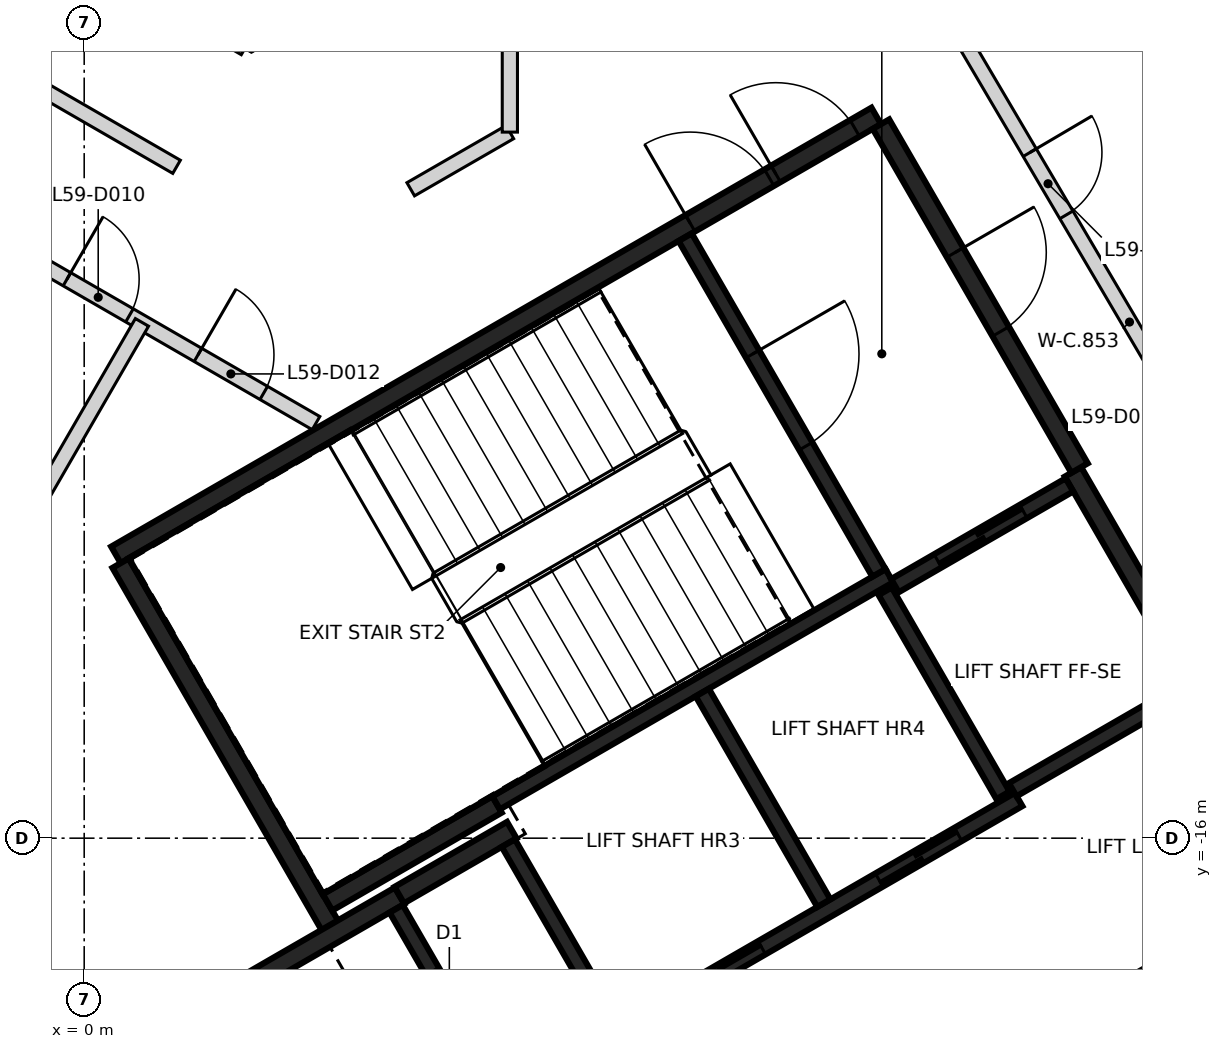
"""IFC4 building model, lengths in metres.
Left out: names, types, materials, properties, quantities, classifications, styles, units other than length and angle.
Written with IfcOpenShell. Run it as: python <this file> out.ifc"""

import sys

from ifc_helpers import new_model, si_unit, direction, frame, frame_2d, origin, place, context, subcontext, project, spatial, rectangle, extrude, element, fill, save


model = new_model("IFC4")
c1 = context("Model", 3, precision=1e-05, world=origin(), true_north=direction((0.0, 1.0)))
c2 = subcontext(c1, "Body", "Model", "MODEL_VIEW")
j1 = project(units=[si_unit("LENGTHUNIT", "METRE"), si_unit("PLANEANGLEUNIT", "RADIAN")], contexts=[c1])
p1 = place(None, origin())
s1 = spatial("IfcSite", under=j1, at=p1, CompositionType="ELEMENT")
p2 = place(p1, origin())
s2 = spatial("IfcBuilding", under=s1, at=p2, CompositionType="ELEMENT")
p3 = place(p2, frame((0.0, 0.0, 235.8)))
s3 = spatial("IfcBuildingStorey", under=s2, at=p3, CompositionType="ELEMENT", Elevation=235.8)
p4 = place(p3, frame((0.417, -12.273, 0.0), z_axis=(0.0, 0.0, 1.0), x_axis=(0.866021906294, 0.500006057782, 0.0)))
e1 = element("IfcWall", 1, at=p4, inside=s3, PredefinedType="SHEAR", context=c2, shape_type="SweptSolid", body=[
    extrude(rectangle(XDim=11.55, YDim=0.25, at=frame_2d((5.775, 0.0))), origin(), (0.0, 0.0, 1.0), 3.25),
])
p5 = place(p4, frame((10.025, 0.0, 0.0)))
e2 = element("IfcOpeningElement", 2, at=p5, cuts=e1, PredefinedType="OPENING", context=c2, shape_type="SweptSolid", body=[
    extrude(rectangle(XDim=1.2, YDim=2.1, at=frame_2d((0.6, 1.05))), frame((0.0, 0.135, 0.0), z_axis=(0.0, -1.0, 0.0), x_axis=(1.0, 0.0, 0.0)), (0.0, 0.0, 1.0), 0.27),
])
p6 = place(p4, frame((8.725, 0.0, 0.0)))
e3 = element("IfcOpeningElement", 3, at=p6, cuts=e1, PredefinedType="OPENING", context=c2, shape_type="SweptSolid", body=[
    extrude(rectangle(XDim=1.2, YDim=2.1, at=frame_2d((0.6, 1.05))), frame((0.0, 0.135, 0.0), z_axis=(0.0, -1.0, 0.0), x_axis=(1.0, 0.0, 0.0)), (0.0, 0.0, 1.0), 0.27),
])
p7 = place(p3, frame((16.133, -16.594, 0.0), z_axis=(0.0, 0.0, 1.0), x_axis=(-0.866022959057, -0.500004234368, 0.0)))
e4 = element("IfcWall", 4, at=p7, inside=s3, PredefinedType="SHEAR", context=c2, shape_type="SweptSolid", body=[
    extrude(rectangle(XDim=8.75, YDim=0.25, at=frame_2d((4.375, 0.0))), origin(), (0.0, 0.0, 1.0), 3.25),
])
p8 = place(p3, frame((13.008, -11.181, 0.0), z_axis=(0.0, 0.0, 1.0), x_axis=(0.500001955336, -0.866024274868, 0.0)))
e5 = element("IfcWall", 5, at=p8, inside=s3, PredefinedType="SHEAR", context=c2, shape_type="SweptSolid", body=[
    extrude(rectangle(XDim=6.125, YDim=0.25, at=frame_2d((3.062, 0.0))), origin(), (0.0, 0.0, 1.0), 3.25),
])
p9 = place(p8, frame((3.563, 0.0, 0.0)))
e6 = element("IfcOpeningElement", 6, at=p9, cuts=e5, PredefinedType="OPENING", context=c2, shape_type="SweptSolid", body=[
    extrude(rectangle(XDim=1.0, YDim=2.1, at=frame_2d((0.5, 1.05))), frame((0.0, 0.135, 0.0), z_axis=(0.0, -1.0, 0.0), x_axis=(1.0, 0.0, 0.0)), (0.0, 0.0, 1.0), 0.27),
])
p10 = place(p3, frame((3.235, -17.153, 0.0), z_axis=(0.0, 0.0, 1.0), x_axis=(-0.500008851346, 0.866020293397, 0.0)))
e7 = element("IfcWall", 7, at=p10, inside=s3, PredefinedType="SHEAR", context=c2, shape_type="SweptSolid", body=[
    extrude(rectangle(XDim=5.51, YDim=0.25, at=frame_2d((2.755, 0.0))), origin(), (0.0, 0.0, 1.0), 3.25),
])
p11 = place(p3, frame((10.483, -6.606, 0.0), z_axis=(0.0, 0.0, 1.0), x_axis=(0.49999885962, -0.866026062182, 0.0)))
e8 = element("IfcWall", 8, at=p11, inside=s3, PredefinedType="SHEAR", context=c2, shape_type="SweptSolid", body=[
    extrude(rectangle(XDim=5.225, YDim=0.25, at=frame_2d((2.612, 0.0))), origin(), (0.0, 0.0, 1.0), 3.25),
])
p12 = place(p11, frame((1.95, 0.0, 0.0)))
e9 = element("IfcOpeningElement", 9, at=p12, cuts=e8, PredefinedType="OPENING", context=c2, shape_type="SweptSolid", body=[
    extrude(rectangle(XDim=1.2, YDim=2.1, at=frame_2d((0.6, 1.05))), frame((0.0, 0.135, 0.0), z_axis=(0.0, -1.0, 0.0), x_axis=(1.0, 0.0, 0.0)), (0.0, 0.0, 1.0), 0.27),
])
p13 = place(p3, frame((1.669, -18.19, 0.0), z_axis=(0.0, 0.0, 1.0), x_axis=(0.866042235819, 0.499970844928, 0.0)))
e10 = element("IfcWall", 10, at=p13, inside=s3, PredefinedType="SHEAR", context=c2, shape_type="SweptSolid", body=[
    extrude(rectangle(XDim=2.865, YDim=0.25, at=frame_2d((1.432, 0.0))), origin(), (0.0, 0.0, 1.0), 3.25),
])
p14 = place(p3, frame((5.431, -15.556, 0.0), z_axis=(0.0, 0.0, 1.0), x_axis=(-0.866022940537, -0.500004266446, 0.0)))
e11 = element("IfcWall", 11, at=p14, inside=s3, PredefinedType="SHEAR", context=c2, shape_type="SweptSolid", body=[
    extrude(rectangle(XDim=2.575, YDim=0.25, at=frame_2d((1.287, 0.0))), origin(), (0.0, 0.0, 1.0), 3.25),
])
p15 = place(p3, frame((4.145, -16.749, 0.0), z_axis=(0.0, 0.0, 1.0), x_axis=(0.866038183914, 0.499977863513, 0.0)))
e12 = element("IfcWall", 12, at=p15, inside=s3, PredefinedType="SHEAR", context=c2, shape_type="SweptSolid", body=[
    extrude(rectangle(XDim=1.71, YDim=0.25, at=frame_2d((0.855, 0.0))), origin(), (0.0, 0.0, 1.0), 3.25),
])
p16 = place(p3, frame((5.419, -15.534, 0.0), z_axis=(0.0, 0.0, 1.0), x_axis=(0.866029065029, 0.499993658486, 0.0)))
e13 = element("IfcWall", 13, at=p16, inside=s3, PredefinedType="SHEAR", context=c2, shape_type="SweptSolid", body=[
    extrude(rectangle(XDim=5.974, YDim=0.2, at=frame_2d((2.987, 0.0))), origin(), (0.0, 0.0, 1.0), 3.25),
])
p17 = place(p3, frame((7.01, -18.542, 0.0), z_axis=(0.0, 0.0, 1.0), x_axis=(0.866030299012, 0.499991521122, 0.0)))
e14 = element("IfcWall", 14, at=p17, inside=s3, PredefinedType="SHEAR", context=c2, shape_type="SweptSolid", body=[
    extrude(rectangle(XDim=6.1, YDim=0.2, at=frame_2d((3.05, 0.0))), origin(), (0.0, 0.0, 1.0), 3.25),
])
p18 = place(p17, frame((1.0, 0.0, 0.0)))
e15 = element("IfcOpeningElement", 15, at=p18, cuts=e14, PredefinedType="OPENING", context=c2, shape_type="SweptSolid", body=[
    extrude(rectangle(XDim=1.2, YDim=2.1, at=frame_2d((0.6, 1.05))), frame((0.0, 0.11, 0.0), z_axis=(0.0, -1.0, 0.0), x_axis=(1.0, 0.0, 0.0)), (0.0, 0.0, 1.0), 0.22),
])
p19 = place(p17, frame((3.982, 0.0, 0.0)))
e16 = element("IfcOpeningElement", 16, at=p19, cuts=e14, PredefinedType="OPENING", context=c2, shape_type="SweptSolid", body=[
    extrude(rectangle(XDim=1.2, YDim=2.1, at=frame_2d((0.6, 1.05))), frame((0.0, 0.11, 0.0), z_axis=(0.0, -1.0, 0.0), x_axis=(1.0, 0.0, 0.0)), (0.0, 0.0, 1.0), 0.22),
])
p20 = place(p3, frame((7.906, -8.094, 0.0), z_axis=(0.0, 0.0, 1.0), x_axis=(0.500027839223, -0.866009330205, 0.0)))
e17 = element("IfcWall", 17, at=p20, inside=s3, PredefinedType="SHEAR", context=c2, shape_type="SweptSolid", body=[
    extrude(rectangle(XDim=5.098, YDim=0.2, at=frame_2d((2.549, 0.0))), origin(), (0.0, 0.0, 1.0), 3.25),
])
p21 = place(p20, frame((1.774, 0.0, 0.0)))
e18 = element("IfcOpeningElement", 18, at=p21, cuts=e17, PredefinedType="OPENING", context=c2, shape_type="SweptSolid", body=[
    extrude(rectangle(XDim=1.4, YDim=2.1, at=frame_2d((0.7, 1.05))), frame((0.0, 0.11, 0.0), z_axis=(0.0, -1.0, 0.0), x_axis=(1.0, 0.0, 0.0)), (0.0, 0.0, 1.0), 0.22),
])
p22 = place(p3, frame((8.132, -14.084, 0.0), z_axis=(0.0, 0.0, 1.0), x_axis=(0.499997778408, -0.866026686418, 0.0)))
e19 = element("IfcWall", 19, at=p22, inside=s3, PredefinedType="SHEAR", context=c2, shape_type="SweptSolid", body=[
    extrude(rectangle(XDim=3.198, YDim=0.2, at=frame_2d((1.599, 0.0))), origin(), (0.0, 0.0, 1.0), 3.25),
])
p23 = place(p3, frame((5.503, -19.352, 0.0), z_axis=(0.0, 0.0, 1.0), x_axis=(-0.499986818241, 0.866033014143, 0.0)))
e20 = element("IfcWall", 20, at=p23, inside=s3, PredefinedType="SHEAR", context=c2, shape_type="SweptSolid", body=[
    extrude(rectangle(XDim=2.798, YDim=0.2, at=frame_2d((1.399, 0.0))), origin(), (0.0, 0.0, 1.0), 3.25),
])
p24 = place(p23, frame((0.949, 0.0, 0.0)))
e21 = element("IfcOpeningElement", 21, at=p24, cuts=e20, PredefinedType="OPENING", context=c2, shape_type="SweptSolid", body=[
    extrude(rectangle(XDim=0.9, YDim=2.1, at=frame_2d((0.45, 1.05))), frame((0.0, 0.11, 0.0), z_axis=(0.0, -1.0, 0.0), x_axis=(1.0, 0.0, 0.0)), (0.0, 0.0, 1.0), 0.22),
])
p25 = place(p3, frame((6.96, -18.455, 0.0), z_axis=(0.0, 0.0, 1.0), x_axis=(-0.499926705758, 0.866067716099, 0.0)))
e22 = element("IfcWall", 22, at=p25, inside=s3, PredefinedType="SHEAR", context=c2, shape_type="SweptSolid", body=[
    extrude(rectangle(XDim=2.759, YDim=0.2, at=frame_2d((1.38, 0.0))), origin(), (0.0, 0.0, 1.0), 3.25),
])
p26 = place(p3, frame((12.088, -15.437, 0.0), z_axis=(0.0, 0.0, 1.0), x_axis=(-0.500026960575, 0.86600983753, 0.0)))
e23 = element("IfcWall", 23, at=p26, inside=s3, PredefinedType="SHEAR", context=c2, shape_type="SweptSolid", body=[
    extrude(rectangle(XDim=3.1, YDim=0.2, at=frame_2d((1.55, 0.0))), origin(), (0.0, 0.0, 1.0), 3.25),
])
p27 = place(p3, frame((10.666, -12.678, 0.0), z_axis=(0.0, 0.0, 1.0), x_axis=(0.866018407898, 0.500012117035, 0.0)))
e24 = element("IfcWall", 24, at=p27, inside=s3, PredefinedType="SHEAR", context=c2, shape_type="SweptSolid", body=[
    extrude(rectangle(XDim=2.651, YDim=0.2, at=frame_2d((1.325, 0.0))), origin(), (0.0, 0.0, 1.0), 3.25),
])
p28 = place(p27, frame((0.652, 0.0, 0.0)))
e25 = element("IfcOpeningElement", 25, at=p28, cuts=e24, PredefinedType="OPENING", context=c2, shape_type="SweptSolid", body=[
    extrude(rectangle(XDim=1.3, YDim=2.1, at=frame_2d((0.65, 1.05))), frame((0.0, 0.11, 0.0), z_axis=(0.0, -1.0, 0.0), x_axis=(1.0, 0.0, 0.0)), (0.0, 0.0, 1.0), 0.22),
])
p29 = place(p3, frame((14.512, -14.037, 0.0), z_axis=(0.0, 0.0, 1.0), x_axis=(-0.866018407898, -0.500012117035, 0.0)))
e26 = element("IfcWall", 26, at=p29, inside=s3, PredefinedType="SHEAR", context=c2, shape_type="SweptSolid", body=[
    extrude(rectangle(XDim=2.651, YDim=0.2, at=frame_2d((1.325, 0.0))), origin(), (0.0, 0.0, 1.0), 3.25),
])
p30 = place(p3, frame((-8.612, -1.494, 0.0), z_axis=(0.0, 0.0, 1.0), x_axis=(0.866035468681, -0.499982566683, 0.0)))
e27 = element("IfcWall", 27, at=p30, inside=s3, PredefinedType="PARTITIONING", context=c2, shape_type="SweptSolid", body=[
    extrude(rectangle(XDim=11.348, YDim=0.2, at=frame_2d((5.674, 0.0))), origin(), (0.0, 0.0, 1.0), 3.25),
])
p31 = place(p30, frame((1.241, 0.0, 0.0)))
e28 = element("IfcOpeningElement", 28, at=p31, cuts=e27, PredefinedType="OPENING", context=c2, shape_type="SweptSolid", body=[
    extrude(rectangle(XDim=0.9, YDim=2.1, at=frame_2d((0.45, 1.05))), frame((0.0, 0.11, 0.0), z_axis=(0.0, -1.0, 0.0), x_axis=(1.0, 0.0, 0.0)), (0.0, 0.0, 1.0), 0.22),
])
p32 = place(p30, frame((6.903, 0.0, 0.0)))
e29 = element("IfcOpeningElement", 29, at=p32, cuts=e27, PredefinedType="OPENING", context=c2, shape_type="SweptSolid", body=[
    extrude(rectangle(XDim=0.9, YDim=2.1, at=frame_2d((0.45, 1.05))), frame((0.0, 0.11, 0.0), z_axis=(0.0, -1.0, 0.0), x_axis=(1.0, 0.0, 0.0)), (0.0, 0.0, 1.0), 0.22),
])
p33 = place(p3, frame((-8.153, -4.069, 0.0), z_axis=(0.0, 0.0, 1.0), x_axis=(0.865955522833, -0.500121017829, 0.0)))
e30 = element("IfcWall", 30, at=p33, inside=s3, PredefinedType="PARTITIONING", context=c2, shape_type="SweptSolid", body=[
    extrude(rectangle(XDim=12.937, YDim=0.2, at=frame_2d((6.469, 0.0))), origin(), (0.0, 0.0, 1.0), 3.25),
])
p34 = place(p33, frame((3.337, 0.0, 0.0)))
e31 = element("IfcOpeningElement", 31, at=p34, cuts=e30, PredefinedType="OPENING", context=c2, shape_type="SweptSolid", body=[
    extrude(rectangle(XDim=1.0, YDim=2.1, at=frame_2d((0.5, 1.05))), frame((0.0, 0.11, 0.0), z_axis=(0.0, -1.0, 0.0), x_axis=(1.0, 0.0, 0.0)), (0.0, 0.0, 1.0), 0.22),
])
p35 = place(p33, frame((9.153, 0.0, 0.0)))
e32 = element("IfcOpeningElement", 32, at=p35, cuts=e30, PredefinedType="OPENING", context=c2, shape_type="SweptSolid", body=[
    extrude(rectangle(XDim=0.95, YDim=2.1, at=frame_2d((0.475, 1.05))), frame((0.0, 0.11, 0.0), z_axis=(0.0, -1.0, 0.0), x_axis=(1.0, 0.0, 0.0)), (0.0, 0.0, 1.0), 0.22),
])
p36 = place(p33, frame((11.144, 0.0, 0.0)))
e33 = element("IfcOpeningElement", 33, at=p36, cuts=e30, PredefinedType="OPENING", context=c2, shape_type="SweptSolid", body=[
    extrude(rectangle(XDim=1.0, YDim=2.1, at=frame_2d((0.5, 1.05))), frame((0.0, 0.11, 0.0), z_axis=(0.0, -1.0, 0.0), x_axis=(1.0, 0.0, 0.0)), (0.0, 0.0, 1.0), 0.22),
])
p37 = place(p3, frame((4.296, -7.463, 0.0), z_axis=(0.0, 0.0, 1.0), x_axis=(0.86632054743, 0.499488447414, 0.0)))
e34 = element("IfcWall", 34, at=p37, inside=s3, PredefinedType="PARTITIONING", context=c2, shape_type="SweptSolid", body=[
    extrude(rectangle(XDim=1.505, YDim=0.2, at=frame_2d((0.753, 0.0))), origin(), (0.0, 0.0, 1.0), 3.25),
])
p38 = place(p3, frame((5.6, -6.711, 0.0), z_axis=(0.0, 0.0, 1.0), x_axis=(0.0, 1.0, 0.0)))
e35 = element("IfcWall", 35, at=p38, inside=s3, PredefinedType="PARTITIONING", context=c2, shape_type="SweptSolid", body=[
    extrude(rectangle(XDim=13.422, YDim=0.2, at=frame_2d((6.711, 0.0))), origin(), (0.0, 0.0, 1.0), 3.25),
])
p39 = place(p38, frame((2.912, 0.0, 0.0)))
e36 = element("IfcOpeningElement", 36, at=p39, cuts=e35, PredefinedType="OPENING", context=c2, shape_type="SweptSolid", body=[
    extrude(rectangle(XDim=0.9, YDim=2.1, at=frame_2d((0.45, 1.05))), frame((0.0, 0.11, 0.0), z_axis=(0.0, -1.0, 0.0), x_axis=(1.0, 0.0, 0.0)), (0.0, 0.0, 1.0), 0.22),
])
p40 = place(p38, frame((9.611, 0.0, 0.0)))
e37 = element("IfcOpeningElement", 37, at=p40, cuts=e35, PredefinedType="OPENING", context=c2, shape_type="SweptSolid", body=[
    extrude(rectangle(XDim=0.9, YDim=2.1, at=frame_2d((0.45, 1.05))), frame((0.0, 0.11, 0.0), z_axis=(0.0, -1.0, 0.0), x_axis=(1.0, 0.0, 0.0)), (0.0, 0.0, 1.0), 0.22),
])
p41 = place(p3, frame((11.571, -5.505, 0.0), z_axis=(0.0, 0.0, 1.0), x_axis=(0.507291838928, -0.861774326699, 0.0)))
e38 = element("IfcWall", 38, at=p41, inside=s3, PredefinedType="PARTITIONING", context=c2, shape_type="SweptSolid", body=[
    extrude(rectangle(XDim=8.599, YDim=0.2, at=frame_2d((4.299, 0.0))), origin(), (0.0, 0.0, 1.0), 3.25),
])
p42 = place(p41, frame((1.712, 0.0, 0.0)))
e39 = element("IfcOpeningElement", 39, at=p42, cuts=e38, PredefinedType="OPENING", context=c2, shape_type="SweptSolid", body=[
    extrude(rectangle(XDim=0.95, YDim=2.1, at=frame_2d((0.475, 1.05))), frame((0.0, 0.11, 0.0), z_axis=(0.0, -1.0, 0.0), x_axis=(1.0, 0.0, 0.0)), (0.0, 0.0, 1.0), 0.22),
])
p43 = place(p3, frame((-6.0, -0.924, 0.0), z_axis=(0.0, 0.0, 1.0), x_axis=(0.866223755075, -0.499656288007, 0.0)))
e40 = element("IfcWall", 40, at=p43, inside=s3, PredefinedType="PARTITIONING", context=c2, shape_type="SweptSolid", body=[
    extrude(rectangle(XDim=9.37, YDim=0.2, at=frame_2d((4.685, 0.0))), origin(), (0.0, 0.0, 1.0), 3.25),
])
p44 = place(p3, frame((-4.942, -19.089, 0.0), z_axis=(0.0, 0.0, 1.0), x_axis=(0.500021458202, 0.866013014531, 0.0)))
e41 = element("IfcWall", 41, at=p44, inside=s3, PredefinedType="PARTITIONING", context=c2, shape_type="SweptSolid", body=[
    extrude(rectangle(XDim=11.403, YDim=0.2, at=frame_2d((5.701, 0.0))), origin(), (0.0, 0.0, 1.0), 2.35),
])
p45 = place(p28, origin())
e42 = element("IfcDoor", 42, at=p45, inside=s3, OperationType="SLIDING_TO_RIGHT", PredefinedType="DOOR", context=c2, shape_type="SweptSolid", body=[
    extrude(rectangle(XDim=1.3, YDim=2.1, at=frame_2d((0.65, 1.05))), frame((0.0, 0.025, 0.0), z_axis=(0.0, -1.0, 0.0), x_axis=(1.0, 0.0, 0.0)), (0.0, 0.0, 1.0), 0.05),
])
fill(e25, e42)
p46 = place(p18, origin())
e43 = element("IfcDoor", 43, at=p46, inside=s3, OperationType="DOUBLE_DOOR_SLIDING", PredefinedType="DOOR", context=c2, shape_type="SweptSolid", body=[
    extrude(rectangle(XDim=1.2, YDim=2.1, at=frame_2d((0.6, 1.05))), frame((0.0, 0.025, 0.0), z_axis=(0.0, -1.0, 0.0), x_axis=(1.0, 0.0, 0.0)), (0.0, 0.0, 1.0), 0.05),
])
fill(e15, e43)
p47 = place(p19, origin())
e44 = element("IfcDoor", 44, at=p47, inside=s3, OperationType="DOUBLE_DOOR_SLIDING", PredefinedType="DOOR", context=c2, shape_type="SweptSolid", body=[
    extrude(rectangle(XDim=1.2, YDim=2.1, at=frame_2d((0.6, 1.05))), frame((0.0, 0.025, 0.0), z_axis=(0.0, -1.0, 0.0), x_axis=(1.0, 0.0, 0.0)), (0.0, 0.0, 1.0), 0.05),
])
fill(e16, e44)
p48 = place(p5, origin())
e45 = element("IfcDoor", 45, at=p48, inside=s3, OperationType="SINGLE_SWING_LEFT", PredefinedType="DOOR", context=c2, shape_type="SweptSolid", body=[
    extrude(rectangle(XDim=1.2, YDim=2.1, at=frame_2d((0.6, 1.05))), frame((0.0, 0.025, 0.0), z_axis=(0.0, -1.0, 0.0), x_axis=(1.0, 0.0, 0.0)), (0.0, 0.0, 1.0), 0.05),
])
fill(e2, e45)
p49 = place(p6, origin())
e46 = element("IfcDoor", 46, at=p49, inside=s3, OperationType="SINGLE_SWING_RIGHT", PredefinedType="DOOR", context=c2, shape_type="SweptSolid", body=[
    extrude(rectangle(XDim=1.2, YDim=2.1, at=frame_2d((0.6, 1.05))), frame((0.0, 0.025, 0.0), z_axis=(0.0, -1.0, 0.0), x_axis=(1.0, 0.0, 0.0)), (0.0, 0.0, 1.0), 0.05),
])
fill(e3, e46)
p50 = place(p21, origin())
e47 = element("IfcDoor", 47, at=p50, inside=s3, OperationType="SINGLE_SWING_RIGHT", PredefinedType="DOOR", context=c2, shape_type="SweptSolid", body=[
    extrude(rectangle(XDim=1.4, YDim=2.1, at=frame_2d((0.7, 1.05))), frame((0.0, 0.025, 0.0), z_axis=(0.0, -1.0, 0.0), x_axis=(1.0, 0.0, 0.0)), (0.0, 0.0, 1.0), 0.05),
])
fill(e18, e47)
p51 = place(p12, origin())
e48 = element("IfcDoor", 48, at=p51, inside=s3, OperationType="SINGLE_SWING_LEFT", PredefinedType="DOOR", context=c2, shape_type="SweptSolid", body=[
    extrude(rectangle(XDim=1.2, YDim=2.1, at=frame_2d((0.6, 1.05))), frame((0.0, 0.025, 0.0), z_axis=(0.0, -1.0, 0.0), x_axis=(1.0, 0.0, 0.0)), (0.0, 0.0, 1.0), 0.05),
])
fill(e9, e48)
p52 = place(p35, frame((0.95, 0.0, 0.0), z_axis=(0.0, 0.0, 1.0), x_axis=(-1.0, 0.0, 0.0)))
e49 = element("IfcDoor", 49, at=p52, inside=s3, OperationType="SINGLE_SWING_LEFT", PredefinedType="DOOR", context=c2, shape_type="SweptSolid", body=[
    extrude(rectangle(XDim=0.95, YDim=2.1, at=frame_2d((0.475, 1.05))), frame((0.0, 0.025, 0.0), z_axis=(0.0, -1.0, 0.0), x_axis=(1.0, 0.0, 0.0)), (0.0, 0.0, 1.0), 0.05),
])
fill(e32, e49)
p53 = place(p36, frame((1.0, 0.0, 0.0), z_axis=(0.0, 0.0, 1.0), x_axis=(-1.0, 0.0, 0.0)))
e50 = element("IfcDoor", 50, at=p53, inside=s3, OperationType="SINGLE_SWING_LEFT", PredefinedType="DOOR", context=c2, shape_type="SweptSolid", body=[
    extrude(rectangle(XDim=1.0, YDim=2.1, at=frame_2d((0.5, 1.05))), frame((0.0, 0.025, 0.0), z_axis=(0.0, -1.0, 0.0), x_axis=(1.0, 0.0, 0.0)), (0.0, 0.0, 1.0), 0.05),
])
fill(e33, e50)
p54 = place(p42, origin())
e51 = element("IfcDoor", 51, at=p54, inside=s3, OperationType="SINGLE_SWING_LEFT", PredefinedType="DOOR", context=c2, shape_type="SweptSolid", body=[
    extrude(rectangle(XDim=0.95, YDim=2.1, at=frame_2d((0.475, 1.05))), frame((0.0, 0.025, 0.0), z_axis=(0.0, -1.0, 0.0), x_axis=(1.0, 0.0, 0.0)), (0.0, 0.0, 1.0), 0.05),
])
fill(e39, e51)
save(model, sys.argv[1])
